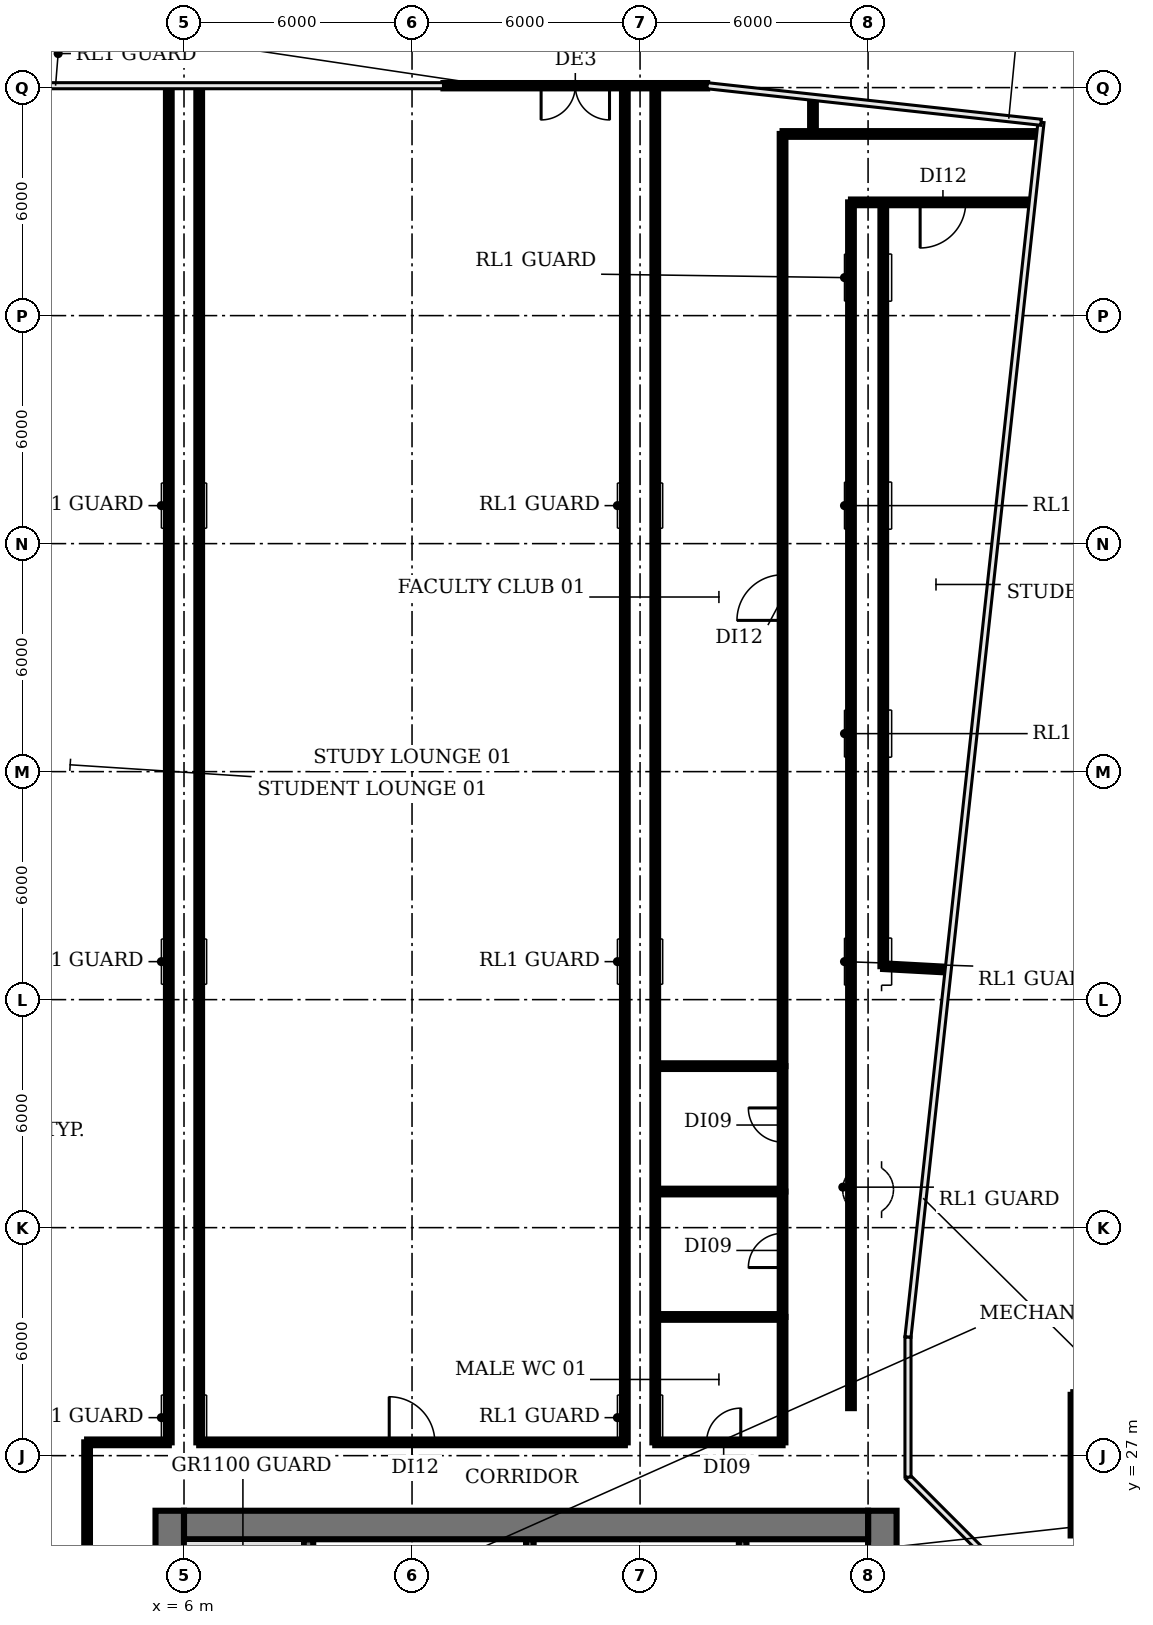
"""IFC4 building model, lengths in metres.
Left out: names, types, materials, properties, quantities, classifications, styles, units other than length and angle.
Written with IfcOpenShell. Run it as: python <this file> out.ifc"""

import sys

from ifc_helpers import new_model, si_unit, direction, frame, frame_2d, origin, place, context, subcontext, project, spatial, rectangle, extrude, element, fill, save


model = new_model("IFC4")
c1 = context("Model", 3, precision=1e-05, world=origin(), true_north=direction((0.0, 1.0)))
c2 = subcontext(c1, "Body", "Model", "MODEL_VIEW")
j1 = project(units=[si_unit("LENGTHUNIT", "METRE"), si_unit("PLANEANGLEUNIT", "RADIAN")], contexts=[c1])
p1 = place(None, origin())
s1 = spatial("IfcSite", under=j1, at=p1, CompositionType="ELEMENT")
p2 = place(p1, origin())
s2 = spatial("IfcBuilding", under=s1, at=p2, CompositionType="ELEMENT")
p3 = place(p2, frame((0.0, 0.0, 138.2)))
s3 = spatial("IfcBuildingStorey", under=s2, at=p3, CompositionType="ELEMENT", Elevation=138.2)
p4 = place(p3, frame((19.766, 63.05, 0.0), z_axis=(0.0, 0.0, 1.0), x_axis=(-1.0, 0.0, 0.0)))
e1 = element("IfcWall", 1, at=p4, inside=s3, PredefinedType="SOLIDWALL", context=c2, shape_type="SweptSolid", body=[
    extrude(rectangle(XDim=6.938, YDim=0.14, at=frame_2d((3.469, 0.0))), origin(), (0.0, 0.0, 1.0), 8.05),
])
p5 = place(p4, frame((2.569, 0.0, 0.0)))
e2 = element("IfcOpeningElement", 2, at=p5, cuts=e1, PredefinedType="OPENING", context=c2, shape_type="SweptSolid", body=[
    extrude(rectangle(XDim=1.8, YDim=2.4, at=frame_2d((0.9, 1.2))), frame((0.0, 0.08, 0.0), z_axis=(0.0, -1.0, 0.0), x_axis=(1.0, 0.0, 0.0)), (0.0, 0.0, 1.0), 0.16),
])
p6 = place(p3, frame((29.4, 24.9, 0.0), z_axis=(0.0, 0.0, 1.0), x_axis=(0.0, 1.0, 0.0)))
e3 = element("IfcWall", 3, at=p6, inside=s3, PredefinedType="SOLIDWALL", context=c2, shape_type="SweptSolid", body=[
    extrude(rectangle(XDim=3.7, YDim=0.14, at=frame_2d((1.85, 0.0))), origin(), (0.0, 0.0, 1.0), 8.05),
])
p7 = place(p3, frame((9.275, 18.375, 0.0), z_axis=(0.0, 0.0, 1.0), x_axis=(0.0, 1.0, 0.0)))
e4 = element("IfcWall", 4, at=p7, inside=s3, PredefinedType="SHEAR", context=c2, shape_type="SweptSolid", body=[
    extrude(rectangle(XDim=6.425, YDim=0.25, at=frame_2d((3.212, 0.0))), origin(), (0.0, 0.0, 1.0), 8.05),
])
for number, where, z_axis, x_axis in (
    (5, (15.1, 22.9, 0.0), (0.0, 0.0, 1.0), (0.0, 1.0, 0.0)),
    (6, (20.7, 22.9, 0.0), (0.0, 0.0, 1.0), (0.0, 1.0, 0.0)),
):
    element("IfcWall", number, at=place(p3, frame(where, z_axis=z_axis, x_axis=x_axis)), inside=s3, PredefinedType="SHEAR", context=c2, shape_type="SweptSolid", body=[
        extrude(rectangle(XDim=1.9, YDim=0.2, at=frame_2d((0.95, 0.0))), origin(), (0.0, 0.0, 1.0), 8.05),
    ])
p8 = place(p3, frame((5.625, 4.65, 0.0), z_axis=(0.0, 0.0, 1.0), x_axis=(0.0, 1.0, 0.0)))
e7 = element("IfcWall", 7, at=p8, inside=s3, PredefinedType="SHEAR", context=c2, shape_type="SweptSolid", body=[
    extrude(rectangle(XDim=20.9, YDim=0.75, at=frame_2d((10.45, 0.0))), origin(), (0.0, 0.0, 1.0), 8.05),
])
p9 = place(p8, frame((1.0, 0.0, 0.0)))
e8 = element("IfcOpeningElement", 8, at=p9, cuts=e7, PredefinedType="OPENING", context=c2, shape_type="SweptSolid", body=[
    extrude(rectangle(XDim=1.5, YDim=2.1, at=frame_2d((0.75, 1.05))), frame((0.0, 0.385, 0.0), z_axis=(0.0, -1.0, 0.0), x_axis=(1.0, 0.0, 0.0)), (0.0, 0.0, 1.0), 0.77),
])
p10 = place(p8, frame((7.45, 0.0, 0.0)))
e9 = element("IfcOpeningElement", 9, at=p10, cuts=e7, PredefinedType="OPENING", context=c2, shape_type="SweptSolid", body=[
    extrude(rectangle(XDim=1.2, YDim=2.1, at=frame_2d((0.6, 1.05))), frame((0.0, 0.385, 0.0), z_axis=(0.0, -1.0, 0.0), x_axis=(1.0, 0.0, 0.0)), (0.0, 0.0, 1.0), 0.77),
])
p11 = place(p8, frame((14.0, 0.0, 0.0)))
e10 = element("IfcOpeningElement", 10, at=p11, cuts=e7, PredefinedType="OPENING", context=c2, shape_type="SweptSolid", body=[
    extrude(rectangle(XDim=1.2, YDim=2.1, at=frame_2d((0.6, 1.05))), frame((0.0, 0.385, 0.0), z_axis=(0.0, -1.0, 0.0), x_axis=(1.0, 0.0, 0.0)), (0.0, 0.0, 1.0), 0.77),
])
p12 = place(p3, frame((24.375, 25.55, 0.0), z_axis=(0.0, 0.0, 1.0), x_axis=(0.0, -1.0, 0.0)))
e11 = element("IfcWall", 11, at=p12, inside=s3, PredefinedType="SHEAR", context=c2, shape_type="SweptSolid", body=[
    extrude(rectangle(XDim=20.9, YDim=0.75, at=frame_2d((10.45, 0.0))), origin(), (0.0, 0.0, 1.0), 8.05),
])
p13 = place(p12, frame((18.4, 0.0, 0.0)))
e12 = element("IfcOpeningElement", 12, at=p13, cuts=e11, PredefinedType="OPENING", context=c2, shape_type="SweptSolid", body=[
    extrude(rectangle(XDim=1.5, YDim=2.1, at=frame_2d((0.75, 1.05))), frame((0.0, 0.385, 0.0), z_axis=(0.0, -1.0, 0.0), x_axis=(1.0, 0.0, 0.0)), (0.0, 0.0, 1.0), 0.77),
])
p14 = place(p12, frame((12.3, 0.0, 0.0)))
e13 = element("IfcOpeningElement", 13, at=p14, cuts=e11, PredefinedType="OPENING", context=c2, shape_type="SweptSolid", body=[
    extrude(rectangle(XDim=0.9, YDim=2.1, at=frame_2d((0.45, 1.05))), frame((0.0, 0.385, 0.0), z_axis=(0.0, -1.0, 0.0), x_axis=(1.0, 0.0, 0.0)), (0.0, 0.0, 1.0), 0.77),
])
p15 = place(p12, frame((6.3, 0.0, 0.0)))
e14 = element("IfcOpeningElement", 14, at=p15, cuts=e11, PredefinedType="OPENING", context=c2, shape_type="SweptSolid", body=[
    extrude(rectangle(XDim=2.0, YDim=2.1, at=frame_2d((1.0, 1.05))), frame((0.0, 0.385, 0.0), z_axis=(0.0, -1.0, 0.0), x_axis=(1.0, 0.0, 0.0)), (0.0, 0.0, 1.0), 0.77),
])
p16 = place(p3, frame((6.0, 25.175, 0.0), z_axis=(0.0, 0.0, 1.0), x_axis=(1.0, 0.0, 0.0)))
e15 = element("IfcWall", 15, at=p16, inside=s3, PredefinedType="SHEAR", context=c2, shape_type="SweptSolid", body=[
    extrude(rectangle(XDim=18.0, YDim=0.75, at=frame_2d((9.0, 0.0))), origin(), (0.0, 0.0, 1.0), 8.05),
])
p17 = place(p3, frame((3.45, 22.5, 0.0), z_axis=(0.0, 0.0, 1.0), x_axis=(0.0, 1.0, 0.0)))
e16 = element("IfcWall", 16, at=p17, inside=s3, PredefinedType="PARTITIONING", context=c2, shape_type="SweptSolid", body=[
    extrude(rectangle(XDim=4.85, YDim=0.15, at=frame_2d((2.425, 0.0))), origin(), (0.0, 0.0, 1.0), 6.33),
])
p18 = place(p3, frame((3.45, 27.35, 0.0), z_axis=(0.0, 0.0, 1.0), x_axis=(1.0, 0.0, 0.0)))
e17 = element("IfcWall", 17, at=p18, inside=s3, PredefinedType="PARTITIONING", context=c2, shape_type="SweptSolid", body=[
    extrude(rectangle(XDim=2.15, YDim=0.15, at=frame_2d((1.075, 0.0))), origin(), (0.0, 0.0, 1.0), 6.33),
])
for number, where, z_axis, x_axis in (
    (18, (5.6, 27.35, 0.0), (0.0, 0.0, 1.0), (0.0, 1.0, 0.0)),
    (19, (6.4, 27.35, 0.0), (0.0, 0.0, 1.0), (0.0, 1.0, 0.0)),
):
    element("IfcWall", number, at=place(p3, frame(where, z_axis=z_axis, x_axis=x_axis)), inside=s3, PredefinedType="PARTITIONING", context=c2, shape_type="SweptSolid", body=[
        extrude(rectangle(XDim=35.65, YDim=0.15, at=frame_2d((17.825, 0.0))), origin(), (0.0, 0.0, 1.0), 6.33),
    ])
p19 = place(p3, frame((6.4, 27.35, 0.0), z_axis=(0.0, 0.0, 1.0), x_axis=(1.0, 0.0, 0.0)))
e20 = element("IfcWall", 20, at=p19, inside=s3, PredefinedType="PARTITIONING", context=c2, shape_type="SweptSolid", body=[
    extrude(rectangle(XDim=11.2, YDim=0.15, at=frame_2d((5.6, 0.0))), origin(), (0.0, 0.0, 1.0), 6.33),
])
p20 = place(p19, frame((5.0, 0.0, 0.0)))
e21 = element("IfcOpeningElement", 21, at=p20, cuts=e20, PredefinedType="OPENING", context=c2, shape_type="SweptSolid", body=[
    extrude(rectangle(XDim=1.2, YDim=2.1, at=frame_2d((0.6, 1.05))), frame((0.0, 0.085, 0.0), z_axis=(0.0, -1.0, 0.0), x_axis=(1.0, 0.0, 0.0)), (0.0, 0.0, 1.0), 0.17),
])
for number, where, z_axis, x_axis in (
    (22, (17.6, 27.35, 0.0), (0.0, 0.0, 1.0), (0.0, 1.0, 0.0)),
    (23, (18.4, 27.35, 0.0), (0.0, 0.0, 1.0), (0.0, 1.0, 0.0)),
):
    element("IfcWall", number, at=place(p3, frame(where, z_axis=z_axis, x_axis=x_axis)), inside=s3, PredefinedType="PARTITIONING", context=c2, shape_type="SweptSolid", body=[
        extrude(rectangle(XDim=35.65, YDim=0.15, at=frame_2d((17.825, 0.0))), origin(), (0.0, 0.0, 1.0), 6.33),
    ])
p21 = place(p3, frame((18.4, 27.35, 0.0), z_axis=(0.0, 0.0, 1.0), x_axis=(1.0, 0.0, 0.0)))
e24 = element("IfcWall", 24, at=p21, inside=s3, PredefinedType="PARTITIONING", context=c2, shape_type="SweptSolid", body=[
    extrude(rectangle(XDim=3.35, YDim=0.15, at=frame_2d((1.675, 0.0))), origin(), (0.0, 0.0, 1.0), 6.33),
])
p22 = place(p21, frame((1.35, 0.0, 0.0)))
e25 = element("IfcOpeningElement", 25, at=p22, cuts=e24, PredefinedType="OPENING", context=c2, shape_type="SweptSolid", body=[
    extrude(rectangle(XDim=0.9, YDim=2.1, at=frame_2d((0.45, 1.05))), frame((0.0, 0.085, 0.0), z_axis=(0.0, -1.0, 0.0), x_axis=(1.0, 0.0, 0.0)), (0.0, 0.0, 1.0), 0.17),
])
for number, where, z_axis, x_axis in (
    (26, (18.4, 30.65, 0.0), (0.0, 0.0, 1.0), (1.0, 0.0, 0.0)),
    (27, (18.4, 33.95, 0.0), (0.0, 0.0, 1.0), (1.0, 0.0, 0.0)),
    (28, (18.4, 37.25, 0.0), (0.0, 0.0, 1.0), (1.0, 0.0, 0.0)),
):
    element("IfcWall", number, at=place(p3, frame(where, z_axis=z_axis, x_axis=x_axis)), inside=s3, PredefinedType="PARTITIONING", context=c2, shape_type="SweptSolid", body=[
        extrude(rectangle(XDim=3.35, YDim=0.15, at=frame_2d((1.675, 0.0))), origin(), (0.0, 0.0, 1.0), 6.33),
    ])
p23 = place(p3, frame((21.75, 27.35, 0.0), z_axis=(0.0, 0.0, 1.0), x_axis=(0.0, 1.0, 0.0)))
e29 = element("IfcWall", 29, at=p23, inside=s3, PredefinedType="PARTITIONING", context=c2, shape_type="SweptSolid", body=[
    extrude(rectangle(XDim=3.3, YDim=0.15, at=frame_2d((1.65, 0.0))), origin(), (0.0, 0.0, 1.0), 6.33),
])
p24 = place(p3, frame((21.75, 30.65, 0.0), z_axis=(0.0, 0.0, 1.0), x_axis=(0.0, 1.0, 0.0)))
e30 = element("IfcWall", 30, at=p24, inside=s3, PredefinedType="PARTITIONING", context=c2, shape_type="SweptSolid", body=[
    extrude(rectangle(XDim=3.3, YDim=0.15, at=frame_2d((1.65, 0.0))), origin(), (0.0, 0.0, 1.0), 6.33),
])
p25 = place(p24, frame((1.3, 0.0, 0.0)))
e31 = element("IfcOpeningElement", 31, at=p25, cuts=e30, PredefinedType="OPENING", context=c2, shape_type="SweptSolid", body=[
    extrude(rectangle(XDim=0.9, YDim=2.1, at=frame_2d((0.45, 1.05))), frame((0.0, 0.085, 0.0), z_axis=(0.0, -1.0, 0.0), x_axis=(1.0, 0.0, 0.0)), (0.0, 0.0, 1.0), 0.17),
])
p26 = place(p3, frame((21.75, 33.95, 0.0), z_axis=(0.0, 0.0, 1.0), x_axis=(0.0, 1.0, 0.0)))
e32 = element("IfcWall", 32, at=p26, inside=s3, PredefinedType="PARTITIONING", context=c2, shape_type="SweptSolid", body=[
    extrude(rectangle(XDim=3.3, YDim=0.15, at=frame_2d((1.65, 0.0))), origin(), (0.0, 0.0, 1.0), 6.33),
])
p27 = place(p26, frame((1.3, 0.0, 0.0)))
e33 = element("IfcOpeningElement", 33, at=p27, cuts=e32, PredefinedType="OPENING", context=c2, shape_type="SweptSolid", body=[
    extrude(rectangle(XDim=0.9, YDim=2.1, at=frame_2d((0.45, 1.05))), frame((0.0, 0.085, 0.0), z_axis=(0.0, -1.0, 0.0), x_axis=(1.0, 0.0, 0.0)), (0.0, 0.0, 1.0), 0.17),
])
p28 = place(p3, frame((21.75, 37.25, 0.0), z_axis=(0.0, 0.0, 1.0), x_axis=(0.0, 1.0, 0.0)))
e34 = element("IfcWall", 34, at=p28, inside=s3, PredefinedType="PARTITIONING", context=c2, shape_type="SweptSolid", body=[
    extrude(rectangle(XDim=24.53, YDim=0.15, at=frame_2d((12.265, 0.0))), origin(), (0.0, 0.0, 1.0), 6.33),
])
p29 = place(p28, frame((11.73, 0.0, 0.0)))
e35 = element("IfcOpeningElement", 35, at=p29, cuts=e34, PredefinedType="OPENING", context=c2, shape_type="SweptSolid", body=[
    extrude(rectangle(XDim=1.2, YDim=2.1, at=frame_2d((0.6, 1.05))), frame((0.0, 0.085, 0.0), z_axis=(0.0, -1.0, 0.0), x_axis=(1.0, 0.0, 0.0)), (0.0, 0.0, 1.0), 0.17),
])
p30 = place(p3, frame((21.75, 61.78, 0.0), z_axis=(0.0, 0.0, 1.0), x_axis=(1.0, 0.0, 0.0)))
e36 = element("IfcWall", 36, at=p30, inside=s3, PredefinedType="PARTITIONING", context=c2, shape_type="SweptSolid", body=[
    extrude(rectangle(XDim=6.72, YDim=0.15, at=frame_2d((3.36, 0.0))), origin(), (0.0, 0.0, 1.0), 6.33),
])
p31 = place(p3, frame((22.55, 61.78, 0.0), z_axis=(0.0, 0.0, 1.0), x_axis=(0.0, 1.0, 0.0)))
e37 = element("IfcWall", 37, at=p31, inside=s3, PredefinedType="PARTITIONING", context=c2, shape_type="SweptSolid", body=[
    extrude(rectangle(XDim=0.91, YDim=0.15, at=frame_2d((0.455, 0.0))), origin(), (0.0, 0.0, 1.0), 6.33),
])
p32 = place(p3, frame((23.55, 28.25, 0.0), z_axis=(0.0, 0.0, 1.0), x_axis=(0.0, 1.0, 0.0)))
e38 = element("IfcWall", 38, at=p32, inside=s3, PredefinedType="PARTITIONING", context=c2, shape_type="SweptSolid", body=[
    extrude(rectangle(XDim=31.73, YDim=0.15, at=frame_2d((15.865, 0.0))), origin(), (0.0, 0.0, 1.0), 6.33),
])
p33 = place(p3, frame((24.4, 39.88, 0.0), z_axis=(0.0, 0.0, 1.0), x_axis=(0.0, 1.0, 0.0)))
e39 = element("IfcWall", 39, at=p33, inside=s3, PredefinedType="PARTITIONING", context=c2, shape_type="SweptSolid", body=[
    extrude(rectangle(XDim=20.09, YDim=0.15, at=frame_2d((10.045, 0.0))), origin(), (0.0, 0.0, 1.0), 6.33),
])
p34 = place(p3, frame((24.4, 39.88, 0.0), z_axis=(0.0, 0.0, 1.0), x_axis=(0.998538848833, -0.054038572996, 0.0)))
e40 = element("IfcWall", 40, at=p34, inside=s3, PredefinedType="PARTITIONING", context=c2, shape_type="SweptSolid", body=[
    extrude(rectangle(XDim=1.663, YDim=0.15, at=frame_2d((0.831, 0.0))), origin(), (0.0, 0.0, 1.0), 6.33),
])
p35 = place(p3, frame((28.27, 59.98, 0.0), z_axis=(0.0, 0.0, 1.0), x_axis=(-1.0, 0.0, 0.0)))
e41 = element("IfcWall", 41, at=p35, inside=s3, PredefinedType="PARTITIONING", context=c2, shape_type="SweptSolid", body=[
    extrude(rectangle(XDim=4.72, YDim=0.15, at=frame_2d((2.36, 0.0))), origin(), (0.0, 0.0, 1.0), 6.33),
])
p36 = place(p35, frame((1.7, 0.0, 0.0)))
e42 = element("IfcOpeningElement", 42, at=p36, cuts=e41, PredefinedType="OPENING", context=c2, shape_type="SweptSolid", body=[
    extrude(rectangle(XDim=1.2, YDim=2.1, at=frame_2d((0.6, 1.05))), frame((0.0, 0.085, 0.0), z_axis=(0.0, -1.0, 0.0), x_axis=(1.0, 0.0, 0.0)), (0.0, 0.0, 1.0), 0.17),
])
p37 = place(p5, origin())
e43 = element("IfcDoor", 43, at=p37, inside=s3, OperationType="DOUBLE_DOOR_DOUBLE_SWING", PredefinedType="DOOR", context=c2, shape_type="SweptSolid", body=[
    extrude(rectangle(XDim=1.8, YDim=2.4, at=frame_2d((0.9, 1.2))), frame((0.0, 0.025, 0.0), z_axis=(0.0, -1.0, 0.0), x_axis=(1.0, 0.0, 0.0)), (0.0, 0.0, 1.0), 0.05),
])
fill(e2, e43)
p38 = place(p20, origin())
e44 = element("IfcDoor", 44, at=p38, inside=s3, OperationType="SINGLE_SWING_LEFT", PredefinedType="DOOR", context=c2, shape_type="SweptSolid", body=[
    extrude(rectangle(XDim=1.2, YDim=2.1, at=frame_2d((0.6, 1.05))), frame((0.0, 0.025, 0.0), z_axis=(0.0, -1.0, 0.0), x_axis=(1.0, 0.0, 0.0)), (0.0, 0.0, 1.0), 0.05),
])
fill(e21, e44)
p39 = place(p22, origin())
e45 = element("IfcDoor", 45, at=p39, inside=s3, OperationType="SINGLE_SWING_RIGHT", PredefinedType="DOOR", context=c2, shape_type="SweptSolid", body=[
    extrude(rectangle(XDim=0.9, YDim=2.1, at=frame_2d((0.45, 1.05))), frame((0.0, 0.025, 0.0), z_axis=(0.0, -1.0, 0.0), x_axis=(1.0, 0.0, 0.0)), (0.0, 0.0, 1.0), 0.05),
])
fill(e25, e45)
p40 = place(p25, origin())
e46 = element("IfcDoor", 46, at=p40, inside=s3, OperationType="SINGLE_SWING_LEFT", PredefinedType="DOOR", context=c2, shape_type="SweptSolid", body=[
    extrude(rectangle(XDim=0.9, YDim=2.1, at=frame_2d((0.45, 1.05))), frame((0.0, 0.025, 0.0), z_axis=(0.0, -1.0, 0.0), x_axis=(1.0, 0.0, 0.0)), (0.0, 0.0, 1.0), 0.05),
])
fill(e31, e46)
p41 = place(p27, origin())
e47 = element("IfcDoor", 47, at=p41, inside=s3, OperationType="SINGLE_SWING_RIGHT", PredefinedType="DOOR", context=c2, shape_type="SweptSolid", body=[
    extrude(rectangle(XDim=0.9, YDim=2.1, at=frame_2d((0.45, 1.05))), frame((0.0, 0.025, 0.0), z_axis=(0.0, -1.0, 0.0), x_axis=(1.0, 0.0, 0.0)), (0.0, 0.0, 1.0), 0.05),
])
fill(e33, e47)
p42 = place(p29, origin())
e48 = element("IfcDoor", 48, at=p42, inside=s3, OperationType="SINGLE_SWING_LEFT", PredefinedType="DOOR", context=c2, shape_type="SweptSolid", body=[
    extrude(rectangle(XDim=1.2, YDim=2.1, at=frame_2d((0.6, 1.05))), frame((0.0, 0.025, 0.0), z_axis=(0.0, -1.0, 0.0), x_axis=(1.0, 0.0, 0.0)), (0.0, 0.0, 1.0), 0.05),
])
fill(e35, e48)
p43 = place(p36, origin())
e49 = element("IfcDoor", 49, at=p43, inside=s3, OperationType="SINGLE_SWING_RIGHT", PredefinedType="DOOR", context=c2, shape_type="SweptSolid", body=[
    extrude(rectangle(XDim=1.2, YDim=2.1, at=frame_2d((0.6, 1.05))), frame((0.0, 0.025, 0.0), z_axis=(0.0, -1.0, 0.0), x_axis=(1.0, 0.0, 0.0)), (0.0, 0.0, 1.0), 0.05),
])
fill(e42, e49)
save(model, sys.argv[1])
